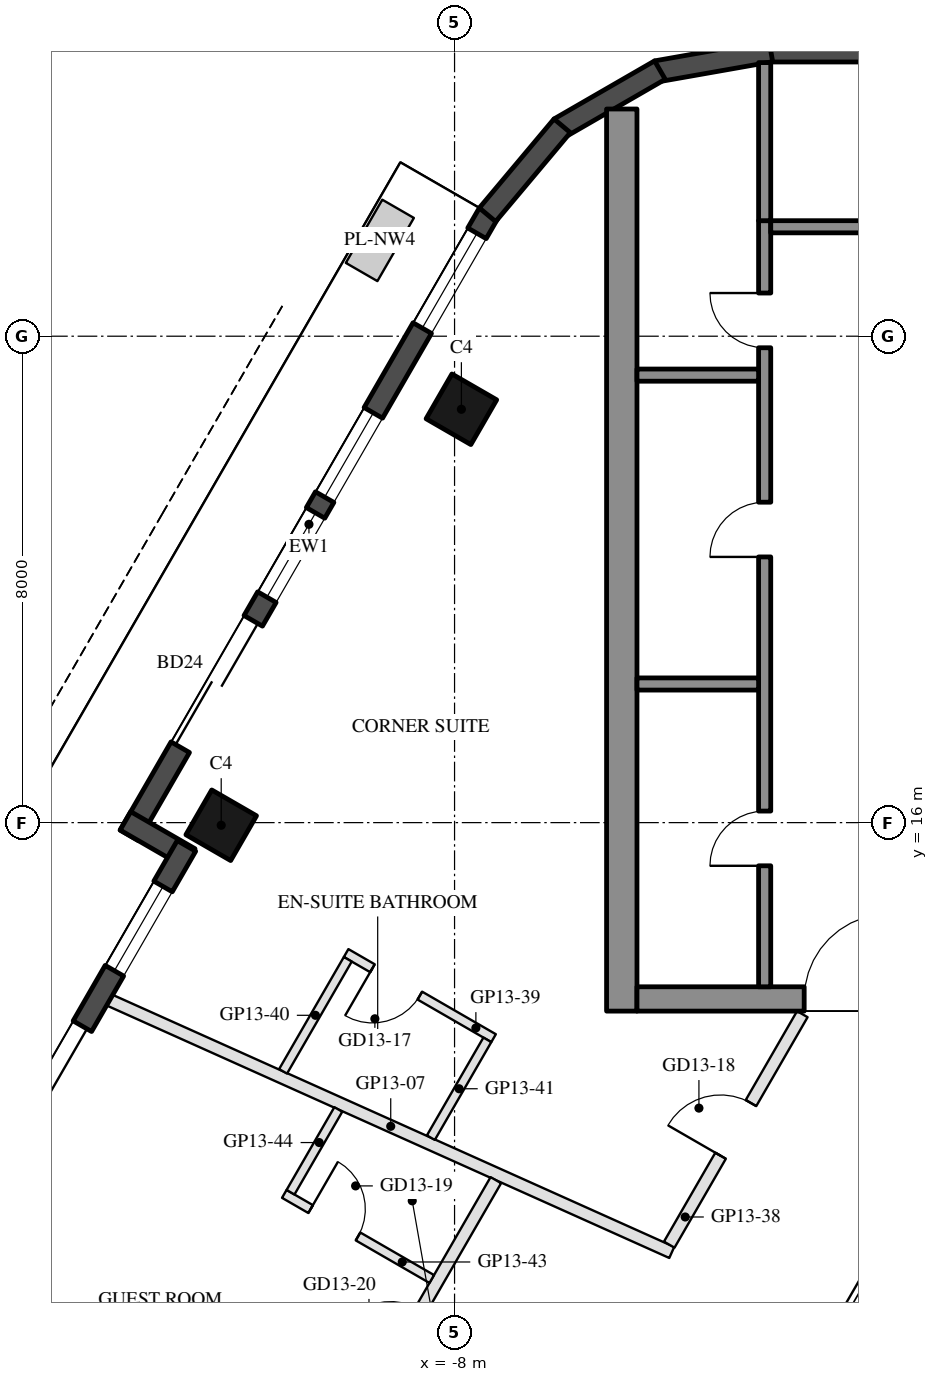
"""IFC4 building model, lengths in metres.
Left out: names, types, materials, properties, quantities, classifications, styles, units other than length and angle.
Written with IfcOpenShell. Run it as: python <this file> out.ifc"""

import sys

from ifc_helpers import new_model, si_unit, direction, frame, frame_2d, origin, origin_2d, place, context, subcontext, project, spatial, rectangle, hollow_rectangle, extrude, element, fill, save


model = new_model("IFC4")
c1 = context("Model", 3, precision=1e-05, world=origin(), true_north=direction((0.0, 1.0)))
c2 = subcontext(c1, "Body", "Model", "MODEL_VIEW")
j1 = project(units=[si_unit("LENGTHUNIT", "METRE"), si_unit("PLANEANGLEUNIT", "RADIAN")], contexts=[c1])
p1 = place(None, origin())
s1 = spatial("IfcSite", under=j1, at=p1, CompositionType="ELEMENT")
p2 = place(p1, origin())
s2 = spatial("IfcBuilding", under=s1, at=p2, CompositionType="ELEMENT")
p3 = place(p2, frame((0.0, 0.0, 157.7)))
s3 = spatial("IfcBuildingStorey", under=s2, at=p3, CompositionType="ELEMENT", Elevation=157.7)
for number, where, z_axis, x_axis in (
    (1, (-7.888, 22.798, 0.0), (0.0, 0.0, 1.0), (0.5, 0.866, 0.0)),
    (2, (-11.838, 15.957, 0.0), (0.0, 0.0, 1.0), (0.5, 0.866, 0.0)),
):
    element("IfcColumn", number, at=place(p3, frame(where, z_axis=z_axis, x_axis=x_axis)), inside=s3, PredefinedType="COLUMN", context=c2, shape_type="SweptSolid", body=[
        extrude(hollow_rectangle(XDim=0.85, YDim=0.85, WallThickness=0.04, at=origin_2d()), origin(), (0.0, 0.0, 1.0), 3.7),
    ])
p4 = place(p3, frame((-7.441, 26.022, 0.0), z_axis=(0.0, 0.0, 1.0), x_axis=(-0.499992533062, -0.86602971478, 0.0)))
e3 = element("IfcWall", 3, at=p4, inside=s3, PredefinedType="SOLIDWALL", context=c2, shape_type="SweptSolid", body=[
    extrude(rectangle(XDim=11.816, YDim=0.35, at=frame_2d((5.908, 0.0))), origin(), (0.0, 0.0, 1.0), 3.55),
])
p5 = place(p4, frame((0.381, 0.0, 0.3)))
e4 = element("IfcOpeningElement", 4, at=p5, cuts=e3, PredefinedType="OPENING", context=c2, shape_type="SweptSolid", body=[
    extrude(rectangle(XDim=1.8, YDim=2.65, at=frame_2d((0.9, 1.325))), frame((0.0, 0.185, 0.0), z_axis=(0.0, -1.0, 0.0), x_axis=(1.0, 0.0, 0.0)), (0.0, 0.0, 1.0), 0.37),
])
p6 = place(p4, frame((7.74, 0.0, 0.0)))
e5 = element("IfcOpeningElement", 5, at=p6, cuts=e3, PredefinedType="OPENING", context=c2, shape_type="SweptSolid", body=[
    extrude(rectangle(XDim=2.4, YDim=2.4, at=frame_2d((1.2, 1.2))), frame((0.0, 0.185, 0.0), z_axis=(0.0, -1.0, 0.0), x_axis=(1.0, 0.0, 0.0)), (0.0, 0.0, 1.0), 0.37),
])
p7 = place(p4, frame((3.791, 0.0, 0.3)))
e6 = element("IfcOpeningElement", 6, at=p7, cuts=e3, PredefinedType="OPENING", context=c2, shape_type="SweptSolid", body=[
    extrude(rectangle(XDim=1.6, YDim=2.65, at=frame_2d((0.8, 1.325))), frame((0.0, 0.185, 0.0), z_axis=(0.0, -1.0, 0.0), x_axis=(1.0, 0.0, 0.0)), (0.0, 0.0, 1.0), 0.37),
])
p8 = place(p4, frame((5.691, 0.0, 0.3)))
e7 = element("IfcOpeningElement", 7, at=p8, cuts=e3, PredefinedType="OPENING", context=c2, shape_type="SweptSolid", body=[
    extrude(rectangle(XDim=1.6, YDim=2.65, at=frame_2d((0.8, 1.325))), frame((0.0, 0.185, 0.0), z_axis=(0.0, -1.0, 0.0), x_axis=(1.0, 0.0, 0.0)), (0.0, 0.0, 1.0), 0.37),
])
p9 = place(p3, frame((-13.413, 16.029, 0.0), z_axis=(0.0, 0.0, 1.0), x_axis=(0.866005645448, -0.500034220881, 0.0)))
e8 = element("IfcWall", 8, at=p9, inside=s3, PredefinedType="SOLIDWALL", context=c2, shape_type="SweptSolid", body=[
    extrude(rectangle(XDim=1.22, YDim=0.35, at=frame_2d((0.61, 0.0))), origin(), (0.0, 0.0, 1.0), 3.55),
])
p10 = place(p3, frame((-12.409, 15.617, 0.0), z_axis=(0.0, 0.0, 1.0), x_axis=(-0.500003597184, -0.866023326939, 0.0)))
e9 = element("IfcWall", 9, at=p10, inside=s3, PredefinedType="SOLIDWALL", context=c2, shape_type="SweptSolid", body=[
    extrude(rectangle(XDim=6.74, YDim=0.35, at=frame_2d((3.37, 0.0))), origin(), (0.0, 0.0, 1.0), 3.55),
])
p11 = place(p10, frame((0.77, 0.0, 0.3)))
e10 = element("IfcOpeningElement", 10, at=p11, cuts=e9, PredefinedType="OPENING", context=c2, shape_type="SweptSolid", body=[
    extrude(rectangle(XDim=1.6, YDim=2.65, at=frame_2d((0.8, 1.325))), frame((0.0, 0.185, 0.0), z_axis=(0.0, -1.0, 0.0), x_axis=(1.0, 0.0, 0.0)), (0.0, 0.0, 1.0), 0.37),
])
p12 = place(p10, frame((3.424, 0.0, 0.0)))
e11 = element("IfcOpeningElement", 11, at=p12, cuts=e9, PredefinedType="OPENING", context=c2, shape_type="SweptSolid", body=[
    extrude(rectangle(XDim=2.4, YDim=2.4, at=frame_2d((1.2, 1.2))), frame((0.0, 0.185, 0.0), z_axis=(0.0, -1.0, 0.0), x_axis=(1.0, 0.0, 0.0)), (0.0, 0.0, 1.0), 0.37),
])
p13 = place(p3, frame((2.829, 28.685, 0.0), z_axis=(0.0, 0.0, 1.0), x_axis=(-1.0, 0.0, 0.0)))
e12 = element("IfcWall", 12, at=p13, inside=s3, PredefinedType="SOLIDWALL", context=c2, shape_type="SweptSolid", body=[
    extrude(rectangle(XDim=5.658, YDim=0.35, at=frame_2d((2.829, 0.0))), origin(), (0.0, 0.0, 1.0), 3.55),
])
for number, where, z_axis, x_axis in (
    (13, (-2.799, 28.688, 0.0), (0.0, 0.0, 1.0), (-0.985, -0.174, 0.0)),
    (14, (-4.623, 28.377, 0.0), (0.0, 0.0, 1.0), (-0.866, -0.5, 0.0)),
):
    element("IfcWall", number, at=place(p3, frame(where, z_axis=z_axis, x_axis=x_axis)), inside=s3, PredefinedType="SOLIDWALL", context=c2, shape_type="SweptSolid", body=[
        extrude(rectangle(XDim=1.91, YDim=0.35, at=frame_2d((0.955, 0.0))), origin(), (0.0, 0.0, 1.0), 3.55),
    ])
p14 = place(p3, frame((-6.23, 27.461, 0.0), z_axis=(0.0, 0.0, 1.0), x_axis=(-0.642808304945, -0.766027077259, 0.0)))
e15 = element("IfcWall", 15, at=p14, inside=s3, PredefinedType="SOLIDWALL", context=c2, shape_type="SweptSolid", body=[
    extrude(rectangle(XDim=1.91, YDim=0.35, at=frame_2d((0.955, 0.0))), origin(), (0.0, 0.0, 1.0), 3.55),
])
p15 = place(p3, frame((-5.25, 12.9, 0.0), z_axis=(0.0, 0.0, 1.0), x_axis=(0.0, 1.0, 0.0)))
e16 = element("IfcWall", 16, at=p15, inside=s3, PredefinedType="SHEAR", context=c2, shape_type="SweptSolid", body=[
    extrude(rectangle(XDim=14.837, YDim=0.5, at=frame_2d((7.418, 0.0))), origin(), (0.0, 0.0, 1.0), 3.5),
])
p16 = place(p3, frame((5.0, 13.1, 0.0), z_axis=(0.0, 0.0, 1.0), x_axis=(-1.0, 0.0, 0.0)))
e17 = element("IfcWall", 17, at=p16, inside=s3, PredefinedType="SHEAR", context=c2, shape_type="SweptSolid", body=[
    extrude(rectangle(XDim=10.0, YDim=0.4, at=frame_2d((5.0, 0.0))), origin(), (0.0, 0.0, 1.0), 3.5),
])
p17 = place(p16, frame((3.55, 0.0, 0.0)))
e18 = element("IfcOpeningElement", 18, at=p17, cuts=e17, PredefinedType="OPENING", context=c2, shape_type="SweptSolid", body=[
    extrude(rectangle(XDim=1.1, YDim=2.1, at=frame_2d((0.55, 1.05))), frame((0.0, 0.21, 0.0), z_axis=(0.0, -1.0, 0.0), x_axis=(1.0, 0.0, 0.0)), (0.0, 0.0, 1.0), 0.42),
])
p18 = place(p16, frame((5.85, 0.0, 0.0)))
e19 = element("IfcOpeningElement", 19, at=p18, cuts=e17, PredefinedType="OPENING", context=c2, shape_type="SweptSolid", body=[
    extrude(rectangle(XDim=1.4, YDim=2.1, at=frame_2d((0.7, 1.05))), frame((0.0, 0.21, 0.0), z_axis=(0.0, -1.0, 0.0), x_axis=(1.0, 0.0, 0.0)), (0.0, 0.0, 1.0), 0.42),
])
p19 = place(p3, frame((-2.9, 13.3, 0.0), z_axis=(0.0, 0.0, 1.0), x_axis=(0.0, 1.0, 0.0)))
e20 = element("IfcWall", 20, at=p19, inside=s3, PredefinedType="SHEAR", context=c2, shape_type="SweptSolid", body=[
    extrude(rectangle(XDim=12.6, YDim=0.2, at=frame_2d((6.3, 0.0))), origin(), (0.0, 0.0, 1.0), 3.5),
])
p20 = place(p19, frame((1.99, 0.0, 0.0)))
e21 = element("IfcOpeningElement", 21, at=p20, cuts=e20, PredefinedType="OPENING", context=c2, shape_type="SweptSolid", body=[
    extrude(rectangle(XDim=0.9, YDim=2.1, at=frame_2d((0.45, 1.05))), frame((0.0, 0.11, 0.0), z_axis=(0.0, -1.0, 0.0), x_axis=(1.0, 0.0, 0.0)), (0.0, 0.0, 1.0), 0.22),
])
p21 = place(p19, frame((7.07, 0.0, 0.0)))
e22 = element("IfcOpeningElement", 22, at=p21, cuts=e20, PredefinedType="OPENING", context=c2, shape_type="SweptSolid", body=[
    extrude(rectangle(XDim=0.9, YDim=2.1, at=frame_2d((0.45, 1.05))), frame((0.0, 0.11, 0.0), z_axis=(0.0, -1.0, 0.0), x_axis=(1.0, 0.0, 0.0)), (0.0, 0.0, 1.0), 0.22),
])
p22 = place(p19, frame((10.51, 0.0, 0.0)))
e23 = element("IfcOpeningElement", 23, at=p22, cuts=e20, PredefinedType="OPENING", context=c2, shape_type="SweptSolid", body=[
    extrude(rectangle(XDim=0.9, YDim=2.1, at=frame_2d((0.45, 1.05))), frame((0.0, 0.11, 0.0), z_axis=(0.0, -1.0, 0.0), x_axis=(1.0, 0.0, 0.0)), (0.0, 0.0, 1.0), 0.22),
])
p23 = place(p3, frame((-0.4, 25.8, 0.0), z_axis=(0.0, 0.0, 1.0), x_axis=(-1.0, 0.0, 0.0)))
e24 = element("IfcWall", 24, at=p23, inside=s3, PredefinedType="SHEAR", context=c2, shape_type="SweptSolid", body=[
    extrude(rectangle(XDim=2.4, YDim=0.2, at=frame_2d((1.2, 0.0))), origin(), (0.0, 0.0, 1.0), 3.5),
])
for number, where, z_axis, x_axis in (
    (25, (-3.0, 18.28, 0.0), (0.0, 0.0, 1.0), (-1.0, 0.0, 0.0)),
    (26, (-3.0, 23.36, 0.0), (0.0, 0.0, 1.0), (-1.0, 0.0, 0.0)),
):
    element("IfcWall", number, at=place(p3, frame(where, z_axis=z_axis, x_axis=x_axis)), inside=s3, PredefinedType="SHEAR", context=c2, shape_type="SweptSolid", body=[
        extrude(rectangle(XDim=2.0, YDim=0.2, at=frame_2d((1.0, 0.0))), origin(), (0.0, 0.0, 1.0), 3.5),
    ])
p24 = place(p3, frame((-2.9, 25.9, 0.0), z_axis=(0.0, 0.0, 1.0), x_axis=(0.0, 1.0, 0.0)))
e27 = element("IfcWall", 27, at=p24, inside=s3, PredefinedType="SHEAR", context=c2, shape_type="SweptSolid", body=[
    extrude(rectangle(XDim=2.6, YDim=0.2, at=frame_2d((1.3, 0.0))), origin(), (0.0, 0.0, 1.0), 3.5),
])
p25 = place(p3, frame((-13.672, 13.08, 0.0), z_axis=(0.0, 0.0, 1.0), x_axis=(0.912311972773, -0.409495866077, 0.0)))
e28 = element("IfcWall", 28, at=p25, inside=s3, PredefinedType="PARTITIONING", context=c2, shape_type="SweptSolid", body=[
    extrude(rectangle(XDim=10.132, YDim=0.2, at=frame_2d((5.066, 0.0))), origin(), (0.0, 0.0, 1.0), 3.06),
])
p26 = place(p3, frame((-4.469, 9.059, 0.0), z_axis=(0.0, 0.0, 1.0), x_axis=(0.499996027077, 0.86602769754, 0.0)))
e29 = element("IfcWall", 29, at=p26, inside=s3, PredefinedType="PARTITIONING", context=c2, shape_type="SweptSolid", body=[
    extrude(rectangle(XDim=4.377, YDim=0.2, at=frame_2d((2.189, 0.0))), origin(), (0.0, 0.0, 1.0), 2.95),
])
p27 = place(p26, frame((1.689, 0.0, 0.0)))
e30 = element("IfcOpeningElement", 30, at=p27, cuts=e29, PredefinedType="OPENING", context=c2, shape_type="SweptSolid", body=[
    extrude(rectangle(XDim=1.0, YDim=2.1, at=frame_2d((0.5, 1.05))), frame((0.0, 0.11, 0.0), z_axis=(0.0, -1.0, 0.0), x_axis=(1.0, 0.0, 0.0)), (0.0, 0.0, 1.0), 0.22),
])
p28 = place(p3, frame((-7.358, 12.455, 0.0), z_axis=(0.0, 0.0, 1.0), x_axis=(-0.866034573852, 0.49998411664, 0.0)))
e31 = element("IfcWall", 31, at=p28, inside=s3, PredefinedType="PARTITIONING", context=c2, shape_type="SweptSolid", body=[
    extrude(rectangle(XDim=2.8, YDim=0.15, at=frame_2d((1.4, 0.0))), origin(), (0.0, 0.0, 1.0), 3.55),
])
p29 = place(p28, frame((1.4, 0.0, 0.0)))
e32 = element("IfcOpeningElement", 32, at=p29, cuts=e31, PredefinedType="OPENING", context=c2, shape_type="SweptSolid", body=[
    extrude(rectangle(XDim=0.9, YDim=2.1, at=frame_2d((0.45, 1.05))), frame((0.0, 0.085, 0.0), z_axis=(0.0, -1.0, 0.0), x_axis=(1.0, 0.0, 0.0)), (0.0, 0.0, 1.0), 0.17),
])
p30 = place(p3, frame((-9.756, 13.752, 0.0), z_axis=(0.0, 0.0, 1.0), x_axis=(-0.50001378257, -0.866017446268, 0.0)))
e33 = element("IfcWall", 33, at=p30, inside=s3, PredefinedType="PARTITIONING", context=c2, shape_type="SweptSolid", body=[
    extrude(rectangle(XDim=2.128, YDim=0.15, at=frame_2d((1.064, 0.0))), origin(), (0.0, 0.0, 1.0), 3.55),
])
p31 = place(p3, frame((-7.461, 12.427, 0.0), z_axis=(0.0, 0.0, 1.0), x_axis=(-0.500025795397, -0.866010510293, 0.0)))
e34 = element("IfcWall", 34, at=p31, inside=s3, PredefinedType="PARTITIONING", context=c2, shape_type="SweptSolid", body=[
    extrude(rectangle(XDim=1.858, YDim=0.15, at=frame_2d((0.929, 0.0))), origin(), (0.0, 0.0, 1.0), 3.55),
])
p32 = place(p3, frame((-10.811, 4.075, 0.0), z_axis=(0.0, 0.0, 1.0), x_axis=(0.500006032813, 0.86602192071, 0.0)))
e35 = element("IfcWall", 35, at=p32, inside=s3, PredefinedType="PARTITIONING", context=c2, shape_type="SweptSolid", body=[
    extrude(rectangle(XDim=6.98, YDim=0.2, at=frame_2d((3.49, 0.0))), origin(), (0.0, 0.0, 1.0), 2.95),
])
p33 = place(p32, frame((3.52, 0.0, 0.0)))
e36 = element("IfcOpeningElement", 36, at=p33, cuts=e35, PredefinedType="OPENING", context=c2, shape_type="SweptSolid", body=[
    extrude(rectangle(XDim=1.0, YDim=2.1, at=frame_2d((0.5, 1.05))), frame((0.0, 0.11, 0.0), z_axis=(0.0, -1.0, 0.0), x_axis=(1.0, 0.0, 0.0)), (0.0, 0.0, 1.0), 0.22),
])
p34 = place(p3, frame((-10.8, 9.894, 0.0), z_axis=(0.0, 0.0, 1.0), x_axis=(0.866056369097, -0.49994636267, 0.0)))
e37 = element("IfcWall", 37, at=p34, inside=s3, PredefinedType="PARTITIONING", context=c2, shape_type="SweptSolid", body=[
    extrude(rectangle(XDim=2.8, YDim=0.15, at=frame_2d((1.4, 0.0))), origin(), (0.0, 0.0, 1.0), 3.55),
])
p35 = place(p34, frame((0.5, 0.0, 0.0)))
e38 = element("IfcOpeningElement", 38, at=p35, cuts=e37, PredefinedType="OPENING", context=c2, shape_type="SweptSolid", body=[
    extrude(rectangle(XDim=0.9, YDim=2.1, at=frame_2d((0.45, 1.05))), frame((0.0, 0.085, 0.0), z_axis=(0.0, -1.0, 0.0), x_axis=(1.0, 0.0, 0.0)), (0.0, 0.0, 1.0), 0.17),
])
p36 = place(p3, frame((-9.912, 11.283, 0.0), z_axis=(0.0, 0.0, 1.0), x_axis=(-0.499964459118, -0.86604592235, 0.0)))
e39 = element("IfcWall", 39, at=p36, inside=s3, PredefinedType="PARTITIONING", context=c2, shape_type="SweptSolid", body=[
    extrude(rectangle(XDim=1.572, YDim=0.15, at=frame_2d((0.786, 0.0))), origin(), (0.0, 0.0, 1.0), 2.95),
])
p37 = place(p5, origin())
e40 = element("IfcWindow", 40, at=p37, inside=s3, PartitioningType="SINGLE_PANEL", PredefinedType="WINDOW", context=c2, shape_type="SweptSolid", body=[
    extrude(rectangle(XDim=1.8, YDim=2.65, at=frame_2d((0.9, 1.325))), frame((0.0, 0.03, 0.0), z_axis=(0.0, -1.0, 0.0), x_axis=(1.0, 0.0, 0.0)), (0.0, 0.0, 1.0), 0.06),
])
fill(e4, e40)
p38 = place(p6, frame((2.4, 0.0, 0.0), z_axis=(0.0, 0.0, 1.0), x_axis=(-1.0, 0.0, 0.0)))
e41 = element("IfcDoor", 41, at=p38, inside=s3, OperationType="SLIDING_TO_LEFT", PredefinedType="DOOR", context=c2, shape_type="SweptSolid", body=[
    extrude(rectangle(XDim=2.4, YDim=2.4, at=frame_2d((1.2, 1.2))), frame((0.0, 0.025, 0.0), z_axis=(0.0, -1.0, 0.0), x_axis=(1.0, 0.0, 0.0)), (0.0, 0.0, 1.0), 0.05),
])
fill(e5, e41)
p39 = place(p7, origin())
e42 = element("IfcWindow", 42, at=p39, inside=s3, PartitioningType="SINGLE_PANEL", PredefinedType="WINDOW", context=c2, shape_type="SweptSolid", body=[
    extrude(rectangle(XDim=1.6, YDim=2.65, at=frame_2d((0.8, 1.325))), frame((0.0, 0.03, 0.0), z_axis=(0.0, -1.0, 0.0), x_axis=(1.0, 0.0, 0.0)), (0.0, 0.0, 1.0), 0.06),
])
fill(e6, e42)
p40 = place(p8, origin())
e43 = element("IfcWindow", 43, at=p40, inside=s3, PartitioningType="SINGLE_PANEL", PredefinedType="WINDOW", context=c2, shape_type="SweptSolid", body=[
    extrude(rectangle(XDim=1.6, YDim=2.65, at=frame_2d((0.8, 1.325))), frame((0.0, 0.03, 0.0), z_axis=(0.0, -1.0, 0.0), x_axis=(1.0, 0.0, 0.0)), (0.0, 0.0, 1.0), 0.06),
])
fill(e7, e43)
p41 = place(p11, origin())
e44 = element("IfcWindow", 44, at=p41, inside=s3, PartitioningType="SINGLE_PANEL", PredefinedType="WINDOW", context=c2, shape_type="SweptSolid", body=[
    extrude(rectangle(XDim=1.6, YDim=2.65, at=frame_2d((0.8, 1.325))), frame((0.0, 0.03, 0.0), z_axis=(0.0, -1.0, 0.0), x_axis=(1.0, 0.0, 0.0)), (0.0, 0.0, 1.0), 0.06),
])
fill(e10, e44)
p42 = place(p12, frame((2.4, 0.0, 0.0), z_axis=(0.0, 0.0, 1.0), x_axis=(-1.0, 0.0, 0.0)))
e45 = element("IfcDoor", 45, at=p42, inside=s3, OperationType="SLIDING_TO_LEFT", PredefinedType="DOOR", context=c2, shape_type="SweptSolid", body=[
    extrude(rectangle(XDim=2.4, YDim=2.4, at=frame_2d((1.2, 1.2))), frame((0.0, 0.025, 0.0), z_axis=(0.0, -1.0, 0.0), x_axis=(1.0, 0.0, 0.0)), (0.0, 0.0, 1.0), 0.05),
])
fill(e11, e45)
p43 = place(p20, origin())
e46 = element("IfcDoor", 46, at=p43, inside=s3, OperationType="SINGLE_SWING_LEFT", PredefinedType="DOOR", context=c2, shape_type="SweptSolid", body=[
    extrude(rectangle(XDim=0.9, YDim=2.1, at=frame_2d((0.45, 1.05))), frame((0.0, 0.025, 0.0), z_axis=(0.0, -1.0, 0.0), x_axis=(1.0, 0.0, 0.0)), (0.0, 0.0, 1.0), 0.05),
])
fill(e21, e46)
p44 = place(p21, origin())
e47 = element("IfcDoor", 47, at=p44, inside=s3, OperationType="SINGLE_SWING_LEFT", PredefinedType="DOOR", context=c2, shape_type="SweptSolid", body=[
    extrude(rectangle(XDim=0.9, YDim=2.1, at=frame_2d((0.45, 1.05))), frame((0.0, 0.025, 0.0), z_axis=(0.0, -1.0, 0.0), x_axis=(1.0, 0.0, 0.0)), (0.0, 0.0, 1.0), 0.05),
])
fill(e22, e47)
p45 = place(p22, origin())
e48 = element("IfcDoor", 48, at=p45, inside=s3, OperationType="SINGLE_SWING_RIGHT", PredefinedType="DOOR", context=c2, shape_type="SweptSolid", body=[
    extrude(rectangle(XDim=0.9, YDim=2.1, at=frame_2d((0.45, 1.05))), frame((0.0, 0.025, 0.0), z_axis=(0.0, -1.0, 0.0), x_axis=(1.0, 0.0, 0.0)), (0.0, 0.0, 1.0), 0.05),
])
fill(e23, e48)
p46 = place(p18, frame((1.4, 0.0, 0.0), z_axis=(0.0, 0.0, 1.0), x_axis=(-1.0, 0.0, 0.0)))
e49 = element("IfcDoor", 49, at=p46, inside=s3, OperationType="DOUBLE_DOOR_SINGLE_SWING", PredefinedType="DOOR", context=c2, shape_type="SweptSolid", body=[
    extrude(rectangle(XDim=1.4, YDim=2.1, at=frame_2d((0.7, 1.05))), frame((0.0, 0.025, 0.0), z_axis=(0.0, -1.0, 0.0), x_axis=(1.0, 0.0, 0.0)), (0.0, 0.0, 1.0), 0.05),
])
fill(e19, e49)
p47 = place(p29, origin())
e50 = element("IfcDoor", 50, at=p47, inside=s3, OperationType="SINGLE_SWING_RIGHT", PredefinedType="DOOR", context=c2, shape_type="SweptSolid", body=[
    extrude(rectangle(XDim=0.9, YDim=2.1, at=frame_2d((0.45, 1.05))), frame((0.0, 0.025, 0.0), z_axis=(0.0, -1.0, 0.0), x_axis=(1.0, 0.0, 0.0)), (0.0, 0.0, 1.0), 0.05),
])
fill(e32, e50)
p48 = place(p27, origin())
e51 = element("IfcDoor", 51, at=p48, inside=s3, OperationType="SINGLE_SWING_LEFT", PredefinedType="DOOR", context=c2, shape_type="SweptSolid", body=[
    extrude(rectangle(XDim=1.0, YDim=2.1, at=frame_2d((0.5, 1.05))), frame((0.0, 0.025, 0.0), z_axis=(0.0, -1.0, 0.0), x_axis=(1.0, 0.0, 0.0)), (0.0, 0.0, 1.0), 0.05),
])
fill(e30, e51)
p49 = place(p35, origin())
e52 = element("IfcDoor", 52, at=p49, inside=s3, OperationType="SINGLE_SWING_LEFT", PredefinedType="DOOR", context=c2, shape_type="SweptSolid", body=[
    extrude(rectangle(XDim=0.9, YDim=2.1, at=frame_2d((0.45, 1.05))), frame((0.0, 0.025, 0.0), z_axis=(0.0, -1.0, 0.0), x_axis=(1.0, 0.0, 0.0)), (0.0, 0.0, 1.0), 0.05),
])
fill(e38, e52)
save(model, sys.argv[1])
